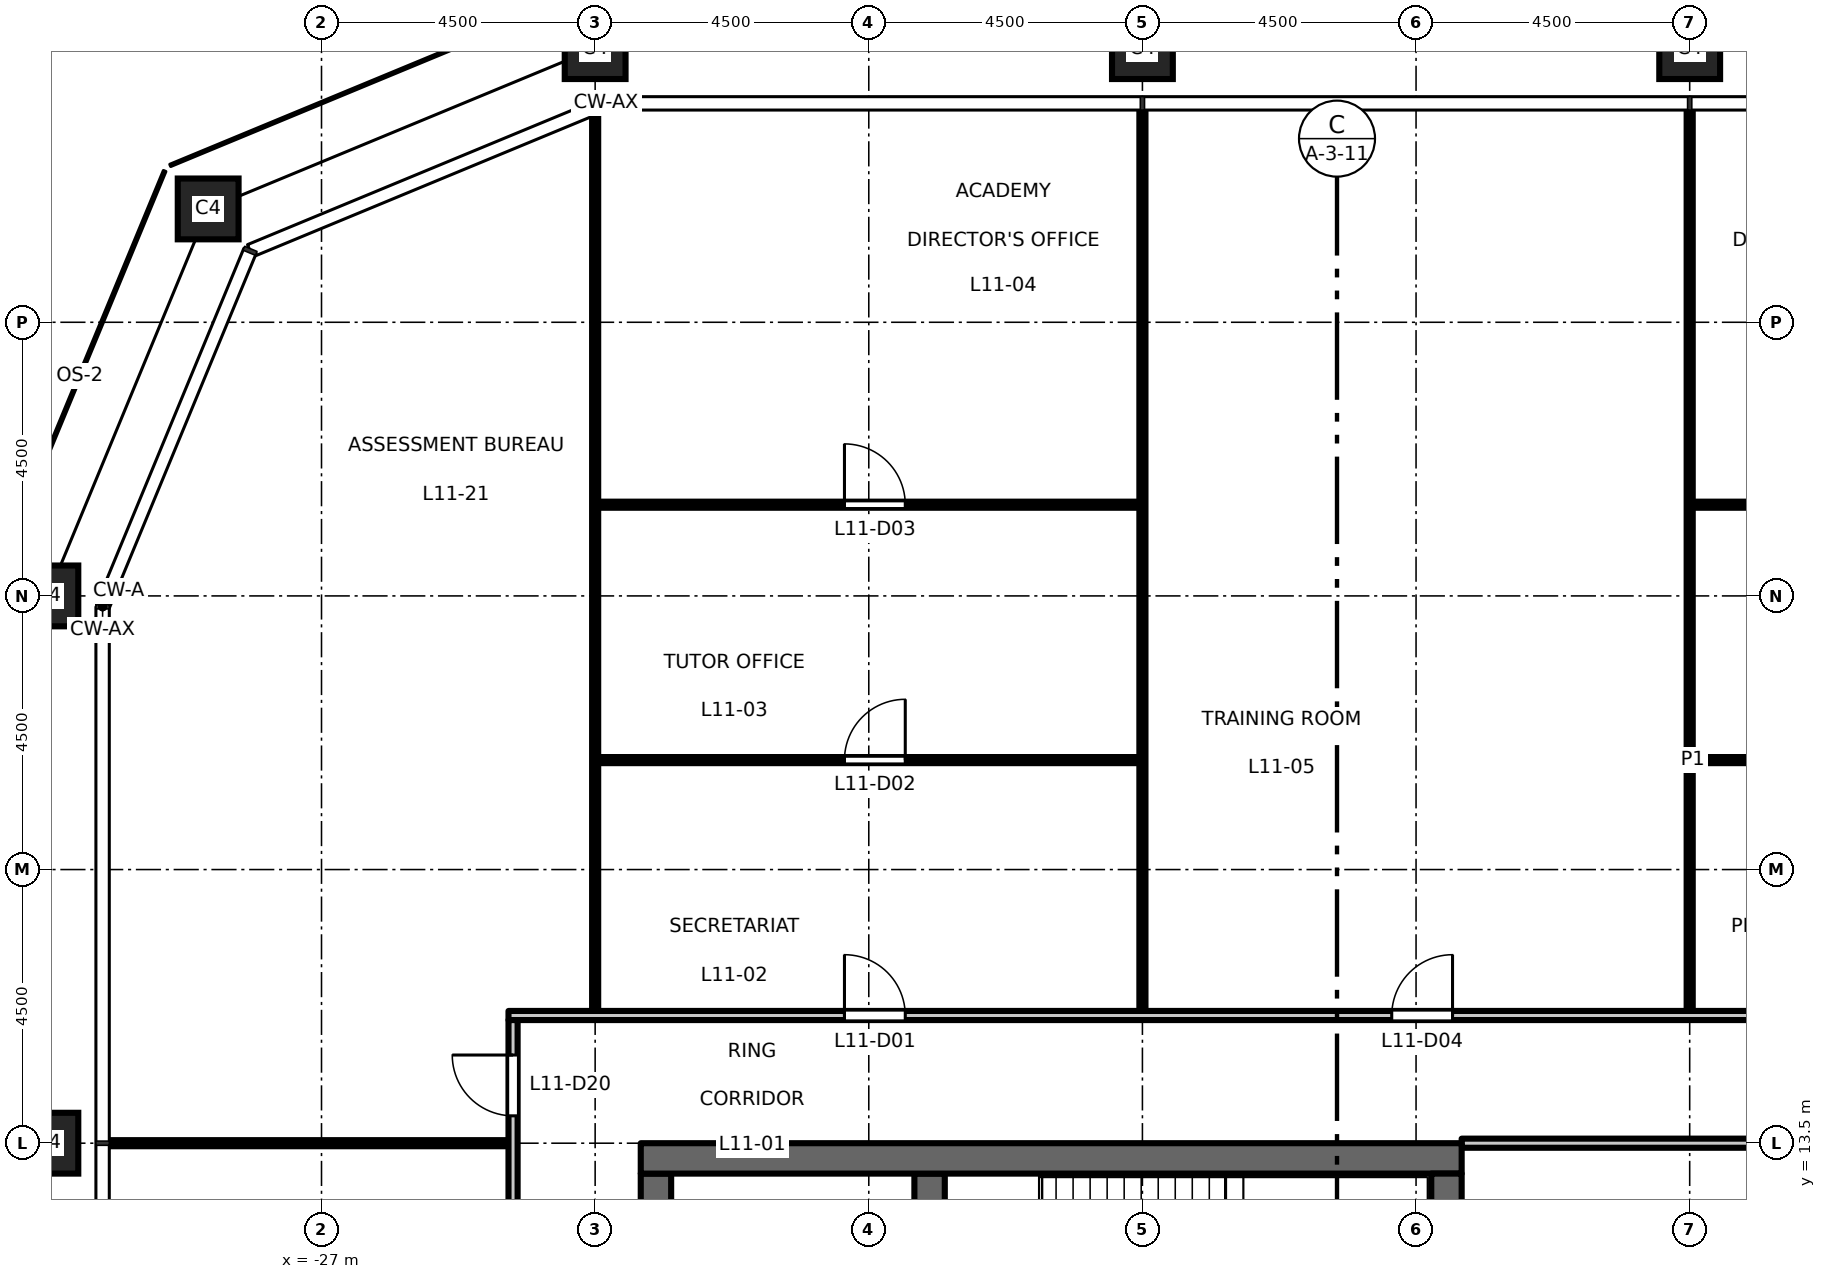
"""IFC4 building model, lengths in metres.
Left out: names, types, materials, properties, quantities, classifications, styles, units other than length and angle.
Written with IfcOpenShell. Run it as: python <this file> out.ifc"""

import sys

from ifc_helpers import new_model, si_unit, direction, frame, frame_2d, origin, origin_2d, place, context, subcontext, project, spatial, rectangle, hollow_rectangle, extrude, element, fill, save


model = new_model("IFC4")
c1 = context("Model", 3, precision=1e-05, world=origin(), true_north=direction((0.0, 1.0)))
c2 = subcontext(c1, "Body", "Model", "MODEL_VIEW")
j1 = project(units=[si_unit("LENGTHUNIT", "METRE"), si_unit("PLANEANGLEUNIT", "RADIAN")], contexts=[c1])
p1 = place(None, origin())
s1 = spatial("IfcSite", under=j1, at=p1, CompositionType="ELEMENT")
p2 = place(p1, origin())
s2 = spatial("IfcBuilding", under=s1, at=p2, CompositionType="ELEMENT")
p3 = place(p2, frame((0.0, 0.0, 53.7)))
s3 = spatial("IfcBuildingStorey", under=s2, at=p3, CompositionType="ELEMENT", Elevation=53.7)
for number, where, z_axis, x_axis in (
    (1, (-4.5, 31.5, 0.0), (0.0, 0.0, 1.0), (1.0, 0.0, 0.0)),
    (2, (-13.5, 31.5, 0.0), (0.0, 0.0, 1.0), (1.0, 0.0, 0.0)),
    (3, (-22.5, 31.5, 0.0), (0.0, 0.0, 1.0), (1.0, 0.0, 0.0)),
    (4, (-28.864, 28.864, 0.0), (0.0, 0.0, 1.0), (1.0, 0.0, 0.0)),
    (5, (-31.5, 22.5, 0.0), (0.0, 0.0, 1.0), (1.0, 0.0, 0.0)),
    (6, (-31.5, 13.5, 0.0), (0.0, 0.0, 1.0), (1.0, 0.0, 0.0)),
):
    element("IfcColumn", number, at=place(p3, frame(where, z_axis=z_axis, x_axis=x_axis)), inside=s3, PredefinedType="COLUMN", context=c2, shape_type="SweptSolid", body=[
        extrude(hollow_rectangle(XDim=1.0, YDim=1.0, WallThickness=0.06, at=origin_2d()), origin(), (0.0, 0.0, 1.0), 4.5),
    ])
p4 = place(p3, frame((-21.5, -13.0, 0.0), z_axis=(0.0, 0.0, 1.0), x_axis=(0.0, 1.0, 0.0)))
e7 = element("IfcWall", 7, at=p4, inside=s3, PredefinedType="SHEAR", context=c2, shape_type="SweptSolid", body=[
    extrude(rectangle(XDim=26.0, YDim=0.5, at=frame_2d((13.0, 0.0))), origin(), (0.0, 0.0, 1.0), 4.35),
])
p5 = place(p4, frame((16.825, 0.0, 0.0)))
e8 = element("IfcOpeningElement", 8, at=p5, cuts=e7, PredefinedType="OPENING", context=c2, shape_type="SweptSolid", body=[
    extrude(rectangle(XDim=1.8, YDim=2.1, at=frame_2d((0.9, 1.05))), frame((0.0, 0.26, 0.0), z_axis=(0.0, -1.0, 0.0), x_axis=(1.0, 0.0, 0.0)), (0.0, 0.0, 1.0), 0.52),
])
p6 = place(p4, frame((7.375, 0.0, 0.0)))
e9 = element("IfcOpeningElement", 9, at=p6, cuts=e7, PredefinedType="OPENING", context=c2, shape_type="SweptSolid", body=[
    extrude(rectangle(XDim=1.8, YDim=2.1, at=frame_2d((0.9, 1.05))), frame((0.0, 0.26, 0.0), z_axis=(0.0, -1.0, 0.0), x_axis=(1.0, 0.0, 0.0)), (0.0, 0.0, 1.0), 0.52),
])
p7 = place(p4, frame((23.4, 0.0, 0.0)))
e10 = element("IfcOpeningElement", 10, at=p7, cuts=e7, PredefinedType="OPENING", context=c2, shape_type="SweptSolid", body=[
    extrude(rectangle(XDim=0.9, YDim=2.1, at=frame_2d((0.45, 1.05))), frame((0.0, 0.26, 0.0), z_axis=(0.0, -1.0, 0.0), x_axis=(1.0, 0.0, 0.0)), (0.0, 0.0, 1.0), 0.52),
])
p8 = place(p3, frame((-17.0, 6.425, 0.0), z_axis=(0.0, 0.0, 1.0), x_axis=(0.0, 1.0, 0.0)))
e11 = element("IfcWall", 11, at=p8, inside=s3, PredefinedType="SHEAR", context=c2, shape_type="SweptSolid", body=[
    extrude(rectangle(XDim=6.575, YDim=0.5, at=frame_2d((3.288, 0.0))), origin(), (0.0, 0.0, 1.0), 4.35),
])
p9 = place(p3, frame((-8.25, 13.25, 0.0), z_axis=(0.0, 0.0, 1.0), x_axis=(-1.0, 0.0, 0.0)))
e12 = element("IfcWall", 12, at=p9, inside=s3, PredefinedType="SHEAR", context=c2, shape_type="SweptSolid", body=[
    extrude(rectangle(XDim=13.5, YDim=0.5, at=frame_2d((6.75, 0.0))), origin(), (0.0, 0.0, 1.0), 4.35),
])
p10 = place(p3, frame((-8.5, -13.0, 0.0), z_axis=(0.0, 0.0, 1.0), x_axis=(0.0, 1.0, 0.0)))
e13 = element("IfcWall", 13, at=p10, inside=s3, PredefinedType="SHEAR", context=c2, shape_type="SweptSolid", body=[
    extrude(rectangle(XDim=26.0, YDim=0.5, at=frame_2d((13.0, 0.0))), origin(), (0.0, 0.0, 1.0), 4.35),
])
p11 = place(p3, frame((-30.51, 13.5, 0.0), z_axis=(0.0, 0.0, 1.0), x_axis=(1.0, 0.0, 0.0)))
e14 = element("IfcWall", 14, at=p11, inside=s3, PredefinedType="PARTITIONING", context=c2, shape_type="SweptSolid", body=[
    extrude(rectangle(XDim=6.585, YDim=0.1, at=frame_2d((3.292, 0.0))), origin(), (0.0, 0.0, 1.0), 3.35),
])
p12 = place(p3, frame((-8.25, 13.5, 0.0), z_axis=(0.0, 0.0, 1.0), x_axis=(1.0, 0.0, 0.0)))
e15 = element("IfcWall", 15, at=p12, inside=s3, PredefinedType="PARTITIONING", context=c2, shape_type="SweptSolid", body=[
    extrude(rectangle(XDim=16.5, YDim=0.15, at=frame_2d((8.25, 0.0))), origin(), (0.0, 0.0, 1.0), 3.85),
])
p13 = place(p12, frame((7.65, 0.0, 0.0)))
e16 = element("IfcOpeningElement", 16, at=p13, cuts=e15, PredefinedType="OPENING", context=c2, shape_type="SweptSolid", body=[
    extrude(rectangle(XDim=1.0, YDim=2.1, at=frame_2d((0.5, 1.05))), frame((0.0, 0.085, 0.0), z_axis=(0.0, -1.0, 0.0), x_axis=(1.0, 0.0, 0.0)), (0.0, 0.0, 1.0), 0.17),
])
p14 = place(p3, frame((-23.925, 15.6, 0.0), z_axis=(0.0, 0.0, 1.0), x_axis=(1.0, 0.0, 0.0)))
e17 = element("IfcWall", 17, at=p14, inside=s3, PredefinedType="PARTITIONING", context=c2, shape_type="SweptSolid", body=[
    extrude(rectangle(XDim=47.85, YDim=0.15, at=frame_2d((23.925, 0.0))), origin(), (0.0, 0.0, 1.0), 4.35),
])
p15 = place(p14, frame((5.525, 0.0, 0.0)))
e18 = element("IfcOpeningElement", 18, at=p15, cuts=e17, PredefinedType="OPENING", context=c2, shape_type="SweptSolid", body=[
    extrude(rectangle(XDim=1.0, YDim=2.1, at=frame_2d((0.5, 1.05))), frame((0.0, 0.085, 0.0), z_axis=(0.0, -1.0, 0.0), x_axis=(1.0, 0.0, 0.0)), (0.0, 0.0, 1.0), 0.17),
])
p16 = place(p14, frame((14.525, 0.0, 0.0)))
e19 = element("IfcOpeningElement", 19, at=p16, cuts=e17, PredefinedType="OPENING", context=c2, shape_type="SweptSolid", body=[
    extrude(rectangle(XDim=1.0, YDim=2.1, at=frame_2d((0.5, 1.05))), frame((0.0, 0.085, 0.0), z_axis=(0.0, -1.0, 0.0), x_axis=(1.0, 0.0, 0.0)), (0.0, 0.0, 1.0), 0.17),
])
p17 = place(p14, frame((23.525, 0.0, 0.0)))
e20 = element("IfcOpeningElement", 20, at=p17, cuts=e17, PredefinedType="OPENING", context=c2, shape_type="SweptSolid", body=[
    extrude(rectangle(XDim=1.0, YDim=2.1, at=frame_2d((0.5, 1.05))), frame((0.0, 0.085, 0.0), z_axis=(0.0, -1.0, 0.0), x_axis=(1.0, 0.0, 0.0)), (0.0, 0.0, 1.0), 0.17),
])
p18 = place(p14, frame((32.525, 0.0, 0.0)))
e21 = element("IfcOpeningElement", 21, at=p18, cuts=e17, PredefinedType="OPENING", context=c2, shape_type="SweptSolid", body=[
    extrude(rectangle(XDim=1.0, YDim=2.1, at=frame_2d((0.5, 1.05))), frame((0.0, 0.085, 0.0), z_axis=(0.0, -1.0, 0.0), x_axis=(1.0, 0.0, 0.0)), (0.0, 0.0, 1.0), 0.17),
])
p19 = place(p14, frame((41.525, 0.0, 0.0)))
e22 = element("IfcOpeningElement", 22, at=p19, cuts=e17, PredefinedType="OPENING", context=c2, shape_type="SweptSolid", body=[
    extrude(rectangle(XDim=1.0, YDim=2.1, at=frame_2d((0.5, 1.05))), frame((0.0, 0.085, 0.0), z_axis=(0.0, -1.0, 0.0), x_axis=(1.0, 0.0, 0.0)), (0.0, 0.0, 1.0), 0.17),
])
p20 = place(p3, frame((-22.45, 19.8, 0.0), z_axis=(0.0, 0.0, 1.0), x_axis=(1.0, 0.0, 0.0)))
e23 = element("IfcWall", 23, at=p20, inside=s3, PredefinedType="PARTITIONING", context=c2, shape_type="SweptSolid", body=[
    extrude(rectangle(XDim=8.9, YDim=0.1, at=frame_2d((4.45, 0.0))), origin(), (0.0, 0.0, 1.0), 4.35),
])
p21 = place(p20, frame((4.05, 0.0, 0.0)))
e24 = element("IfcOpeningElement", 24, at=p21, cuts=e23, PredefinedType="OPENING", context=c2, shape_type="SweptSolid", body=[
    extrude(rectangle(XDim=1.0, YDim=2.1, at=frame_2d((0.5, 1.05))), frame((0.0, 0.06, 0.0), z_axis=(0.0, -1.0, 0.0), x_axis=(1.0, 0.0, 0.0)), (0.0, 0.0, 1.0), 0.12),
])
p22 = place(p3, frame((-4.45, 19.8, 0.0), z_axis=(0.0, 0.0, 1.0), x_axis=(1.0, 0.0, 0.0)))
e25 = element("IfcWall", 25, at=p22, inside=s3, PredefinedType="PARTITIONING", context=c2, shape_type="SweptSolid", body=[
    extrude(rectangle(XDim=26.9, YDim=0.1, at=frame_2d((13.45, 0.0))), origin(), (0.0, 0.0, 1.0), 4.35),
])
p23 = place(p22, frame((4.05, 0.0, 0.0)))
e26 = element("IfcOpeningElement", 26, at=p23, cuts=e25, PredefinedType="OPENING", context=c2, shape_type="SweptSolid", body=[
    extrude(rectangle(XDim=1.0, YDim=2.1, at=frame_2d((0.5, 1.05))), frame((0.0, 0.06, 0.0), z_axis=(0.0, -1.0, 0.0), x_axis=(1.0, 0.0, 0.0)), (0.0, 0.0, 1.0), 0.12),
])
p24 = place(p22, frame((13.05, 0.0, 0.0)))
e27 = element("IfcOpeningElement", 27, at=p24, cuts=e25, PredefinedType="OPENING", context=c2, shape_type="SweptSolid", body=[
    extrude(rectangle(XDim=1.0, YDim=2.1, at=frame_2d((0.5, 1.05))), frame((0.0, 0.06, 0.0), z_axis=(0.0, -1.0, 0.0), x_axis=(1.0, 0.0, 0.0)), (0.0, 0.0, 1.0), 0.12),
])
p25 = place(p22, frame((22.05, 0.0, 0.0)))
e28 = element("IfcOpeningElement", 28, at=p25, cuts=e25, PredefinedType="OPENING", context=c2, shape_type="SweptSolid", body=[
    extrude(rectangle(XDim=1.0, YDim=2.1, at=frame_2d((0.5, 1.05))), frame((0.0, 0.06, 0.0), z_axis=(0.0, -1.0, 0.0), x_axis=(1.0, 0.0, 0.0)), (0.0, 0.0, 1.0), 0.12),
])
p26 = place(p3, frame((-22.45, 24.0, 0.0), z_axis=(0.0, 0.0, 1.0), x_axis=(1.0, 0.0, 0.0)))
e29 = element("IfcWall", 29, at=p26, inside=s3, PredefinedType="PARTITIONING", context=c2, shape_type="SweptSolid", body=[
    extrude(rectangle(XDim=8.9, YDim=0.1, at=frame_2d((4.45, 0.0))), origin(), (0.0, 0.0, 1.0), 3.85),
])
p27 = place(p26, frame((4.05, 0.0, 0.0)))
e30 = element("IfcOpeningElement", 30, at=p27, cuts=e29, PredefinedType="OPENING", context=c2, shape_type="SweptSolid", body=[
    extrude(rectangle(XDim=1.0, YDim=2.1, at=frame_2d((0.5, 1.05))), frame((0.0, 0.06, 0.0), z_axis=(0.0, -1.0, 0.0), x_axis=(1.0, 0.0, 0.0)), (0.0, 0.0, 1.0), 0.12),
])
p28 = place(p3, frame((-4.45, 24.0, 0.0), z_axis=(0.0, 0.0, 1.0), x_axis=(1.0, 0.0, 0.0)))
e31 = element("IfcWall", 31, at=p28, inside=s3, PredefinedType="PARTITIONING", context=c2, shape_type="SweptSolid", body=[
    extrude(rectangle(XDim=8.9, YDim=0.1, at=frame_2d((4.45, 0.0))), origin(), (0.0, 0.0, 1.0), 3.85),
])
p29 = place(p28, frame((4.05, 0.0, 0.0)))
e32 = element("IfcOpeningElement", 32, at=p29, cuts=e31, PredefinedType="OPENING", context=c2, shape_type="SweptSolid", body=[
    extrude(rectangle(XDim=1.0, YDim=2.1, at=frame_2d((0.5, 1.05))), frame((0.0, 0.06, 0.0), z_axis=(0.0, -1.0, 0.0), x_axis=(1.0, 0.0, 0.0)), (0.0, 0.0, 1.0), 0.12),
])
p30 = place(p3, frame((-23.85, -15.525, 0.0), z_axis=(0.0, 0.0, 1.0), x_axis=(0.0, 1.0, 0.0)))
e33 = element("IfcWall", 33, at=p30, inside=s3, PredefinedType="PARTITIONING", context=c2, shape_type="SweptSolid", body=[
    extrude(rectangle(XDim=31.05, YDim=0.15, at=frame_2d((15.525, 0.0))), origin(), (0.0, 0.0, 1.0), 4.35),
])
p31 = place(p30, frame((29.475, 0.0, 0.0)))
e34 = element("IfcOpeningElement", 34, at=p31, cuts=e33, PredefinedType="OPENING", context=c2, shape_type="SweptSolid", body=[
    extrude(rectangle(XDim=1.0, YDim=2.1, at=frame_2d((0.5, 1.05))), frame((0.0, 0.085, 0.0), z_axis=(0.0, -1.0, 0.0), x_axis=(1.0, 0.0, 0.0)), (0.0, 0.0, 1.0), 0.17),
])
p32 = place(p30, frame((0.375, 0.0, 0.0)))
e35 = element("IfcOpeningElement", 35, at=p32, cuts=e33, PredefinedType="OPENING", context=c2, shape_type="SweptSolid", body=[
    extrude(rectangle(XDim=1.0, YDim=2.1, at=frame_2d((0.5, 1.05))), frame((0.0, 0.085, 0.0), z_axis=(0.0, -1.0, 0.0), x_axis=(1.0, 0.0, 0.0)), (0.0, 0.0, 1.0), 0.17),
])
p33 = place(p30, frame((6.125, 0.0, 0.0)))
e36 = element("IfcOpeningElement", 36, at=p33, cuts=e33, PredefinedType="OPENING", context=c2, shape_type="SweptSolid", body=[
    extrude(rectangle(XDim=1.0, YDim=2.1, at=frame_2d((0.5, 1.05))), frame((0.0, 0.085, 0.0), z_axis=(0.0, -1.0, 0.0), x_axis=(1.0, 0.0, 0.0)), (0.0, 0.0, 1.0), 0.17),
])
p34 = place(p30, frame((15.125, 0.0, 0.0)))
e37 = element("IfcOpeningElement", 37, at=p34, cuts=e33, PredefinedType="OPENING", context=c2, shape_type="SweptSolid", body=[
    extrude(rectangle(XDim=1.0, YDim=2.1, at=frame_2d((0.5, 1.05))), frame((0.0, 0.085, 0.0), z_axis=(0.0, -1.0, 0.0), x_axis=(1.0, 0.0, 0.0)), (0.0, 0.0, 1.0), 0.17),
])
p35 = place(p30, frame((24.125, 0.0, 0.0)))
e38 = element("IfcOpeningElement", 38, at=p35, cuts=e33, PredefinedType="OPENING", context=c2, shape_type="SweptSolid", body=[
    extrude(rectangle(XDim=1.0, YDim=2.1, at=frame_2d((0.5, 1.05))), frame((0.0, 0.085, 0.0), z_axis=(0.0, -1.0, 0.0), x_axis=(1.0, 0.0, 0.0)), (0.0, 0.0, 1.0), 0.17),
])
p36 = place(p3, frame((-22.5, 15.675, 0.0), z_axis=(0.0, 0.0, 1.0), x_axis=(0.0, 1.0, 0.0)))
e39 = element("IfcWall", 39, at=p36, inside=s3, PredefinedType="PARTITIONING", context=c2, shape_type="SweptSolid", body=[
    extrude(rectangle(XDim=14.753, YDim=0.1, at=frame_2d((7.376, 0.0))), origin(), (0.0, 0.0, 1.0), 3.35),
])
for number, where, z_axis, x_axis in (
    (40, (-13.5, 15.675, 0.0), (0.0, 0.0, 1.0), (0.0, 1.0, 0.0)),
    (41, (-4.5, 15.675, 0.0), (0.0, 0.0, 1.0), (0.0, 1.0, 0.0)),
):
    element("IfcWall", number, at=place(p3, frame(where, z_axis=z_axis, x_axis=x_axis)), inside=s3, PredefinedType="PARTITIONING", context=c2, shape_type="SweptSolid", body=[
        extrude(rectangle(XDim=14.835, YDim=0.1, at=frame_2d((7.417, 0.0))), origin(), (0.0, 0.0, 1.0), 3.35),
    ])
p37 = place(p15, origin())
e42 = element("IfcDoor", 42, at=p37, inside=s3, OperationType="SINGLE_SWING_LEFT", PredefinedType="DOOR", context=c2, shape_type="SweptSolid", body=[
    extrude(rectangle(XDim=1.0, YDim=2.1, at=frame_2d((0.5, 1.05))), frame((0.0, 0.025, 0.0), z_axis=(0.0, -1.0, 0.0), x_axis=(1.0, 0.0, 0.0)), (0.0, 0.0, 1.0), 0.05),
])
fill(e18, e42)
p38 = place(p21, origin())
e43 = element("IfcDoor", 43, at=p38, inside=s3, OperationType="SINGLE_SWING_RIGHT", PredefinedType="DOOR", context=c2, shape_type="SweptSolid", body=[
    extrude(rectangle(XDim=1.0, YDim=2.1, at=frame_2d((0.5, 1.05))), frame((0.0, 0.025, 0.0), z_axis=(0.0, -1.0, 0.0), x_axis=(1.0, 0.0, 0.0)), (0.0, 0.0, 1.0), 0.05),
])
fill(e24, e43)
p39 = place(p27, origin())
e44 = element("IfcDoor", 44, at=p39, inside=s3, OperationType="SINGLE_SWING_LEFT", PredefinedType="DOOR", context=c2, shape_type="SweptSolid", body=[
    extrude(rectangle(XDim=1.0, YDim=2.1, at=frame_2d((0.5, 1.05))), frame((0.0, 0.025, 0.0), z_axis=(0.0, -1.0, 0.0), x_axis=(1.0, 0.0, 0.0)), (0.0, 0.0, 1.0), 0.05),
])
fill(e30, e44)
p40 = place(p16, origin())
e45 = element("IfcDoor", 45, at=p40, inside=s3, OperationType="SINGLE_SWING_RIGHT", PredefinedType="DOOR", context=c2, shape_type="SweptSolid", body=[
    extrude(rectangle(XDim=1.0, YDim=2.1, at=frame_2d((0.5, 1.05))), frame((0.0, 0.025, 0.0), z_axis=(0.0, -1.0, 0.0), x_axis=(1.0, 0.0, 0.0)), (0.0, 0.0, 1.0), 0.05),
])
fill(e19, e45)
p41 = place(p31, origin())
e46 = element("IfcDoor", 46, at=p41, inside=s3, OperationType="SINGLE_SWING_RIGHT", PredefinedType="DOOR", context=c2, shape_type="SweptSolid", body=[
    extrude(rectangle(XDim=1.0, YDim=2.1, at=frame_2d((0.5, 1.05))), frame((0.0, 0.025, 0.0), z_axis=(0.0, -1.0, 0.0), x_axis=(1.0, 0.0, 0.0)), (0.0, 0.0, 1.0), 0.05),
])
fill(e34, e46)
save(model, sys.argv[1])
